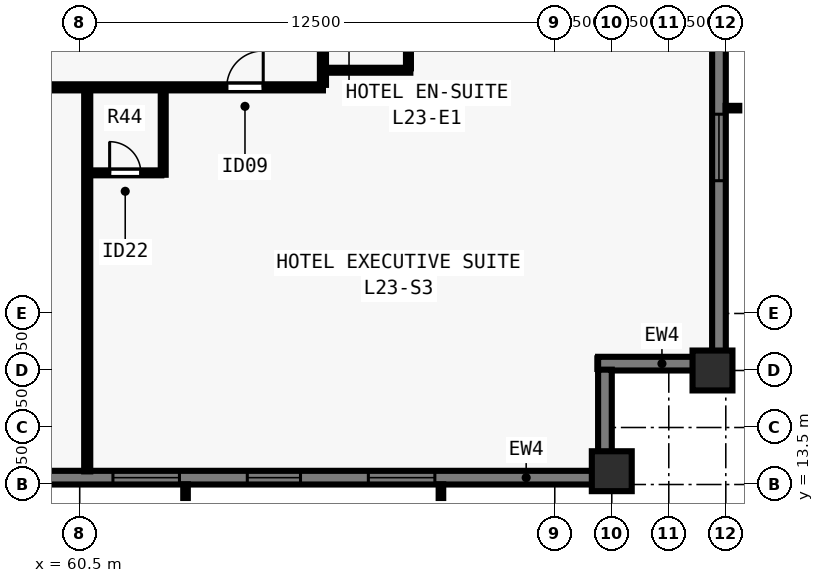
"""IFC4 building model, lengths in metres.
Left out: names, types, materials, properties, quantities, classifications, styles, units other than length and angle.
Written with IfcOpenShell. Run it as: python <this file> out.ifc"""

import sys

from ifc_helpers import new_model, si_unit, direction, frame, frame_2d, origin, origin_2d, place, context, subcontext, project, spatial, rectangle, extrude, element, fill, save


model = new_model("IFC4")
c1 = context("Model", 3, precision=1e-05, world=origin(), true_north=direction((0.0, 1.0)))
c2 = subcontext(c1, "Body", "Model", "MODEL_VIEW")
j1 = project(units=[si_unit("LENGTHUNIT", "METRE"), si_unit("PLANEANGLEUNIT", "RADIAN")], contexts=[c1])
p1 = place(None, origin())
s1 = spatial("IfcSite", under=j1, at=p1, CompositionType="ELEMENT")
p2 = place(p1, origin())
s2 = spatial("IfcBuilding", under=s1, at=p2, CompositionType="ELEMENT")
p3 = place(p2, frame((0.0, 0.0, 86.5)))
s3 = spatial("IfcBuildingStorey", under=s2, at=p3, CompositionType="ELEMENT", Elevation=86.5)
for number, where, z_axis, x_axis in (
    (1, (74.5, 13.85, 0.0), (0.0, 0.0, 1.0), (1.0, 0.0, 0.0)),
    (2, (77.15, 16.5, 0.0), (0.0, 0.0, 1.0), (0.0, 1.0, 0.0)),
):
    element("IfcColumn", number, at=place(p3, frame(where, z_axis=z_axis, x_axis=x_axis)), inside=s3, PredefinedType="COLUMN", context=c2, shape_type="SweptSolid", body=[
        extrude(rectangle(XDim=1.05, YDim=1.05, at=origin_2d()), origin(), (0.0, 0.0, 1.0), 3.5),
    ])
p4 = place(p3, frame((77.32, 61.5, 0.0), z_axis=(0.0, 0.0, 1.0), x_axis=(0.0, -1.0, 0.0)))
e3 = element("IfcWall", 3, at=p4, inside=s3, PredefinedType="SOLIDWALL", context=c2, shape_type="SweptSolid", body=[
    extrude(rectangle(XDim=44.662, YDim=0.36, at=frame_2d((22.331, 0.0))), origin(), (0.0, 0.0, 1.0), 3.28),
])
p5 = place(p4, frame((8.19, 0.0, 0.8)))
e4 = element("IfcOpeningElement", 4, at=p5, cuts=e3, PredefinedType="OPENING", context=c2, shape_type="SweptSolid", body=[
    extrude(rectangle(XDim=1.4, YDim=1.544, at=frame_2d((0.7, 0.772))), frame((0.0, 0.19, 0.0), z_axis=(0.0, -1.0, 0.0), x_axis=(1.0, 0.0, 0.0)), (0.0, 0.0, 1.0), 0.38),
])
p6 = place(p4, frame((11.375, 0.0, 0.8)))
e5 = element("IfcOpeningElement", 5, at=p6, cuts=e3, PredefinedType="OPENING", context=c2, shape_type="SweptSolid", body=[
    extrude(rectangle(XDim=1.75, YDim=1.544, at=frame_2d((0.875, 0.772))), frame((0.0, 0.19, 0.0), z_axis=(0.0, -1.0, 0.0), x_axis=(1.0, 0.0, 0.0)), (0.0, 0.0, 1.0), 0.38),
])
p7 = place(p4, frame((14.911, 0.0, 0.8)))
e6 = element("IfcOpeningElement", 6, at=p7, cuts=e3, PredefinedType="OPENING", context=c2, shape_type="SweptSolid", body=[
    extrude(rectangle(XDim=1.4, YDim=1.544, at=frame_2d((0.7, 0.772))), frame((0.0, 0.19, 0.0), z_axis=(0.0, -1.0, 0.0), x_axis=(1.0, 0.0, 0.0)), (0.0, 0.0, 1.0), 0.38),
])
p8 = place(p4, frame((21.631, 0.0, 0.8)))
e7 = element("IfcOpeningElement", 7, at=p8, cuts=e3, PredefinedType="OPENING", context=c2, shape_type="SweptSolid", body=[
    extrude(rectangle(XDim=1.4, YDim=1.544, at=frame_2d((0.7, 0.772))), frame((0.0, 0.19, 0.0), z_axis=(0.0, -1.0, 0.0), x_axis=(1.0, 0.0, 0.0)), (0.0, 0.0, 1.0), 0.38),
])
p9 = place(p4, frame((23.566, 0.0, 0.8)))
e8 = element("IfcOpeningElement", 8, at=p9, cuts=e3, PredefinedType="OPENING", context=c2, shape_type="SweptSolid", body=[
    extrude(rectangle(XDim=1.75, YDim=1.544, at=frame_2d((0.875, 0.772))), frame((0.0, 0.19, 0.0), z_axis=(0.0, -1.0, 0.0), x_axis=(1.0, 0.0, 0.0)), (0.0, 0.0, 1.0), 0.38),
])
p10 = place(p4, frame((28.351, 0.0, 0.8)))
e9 = element("IfcOpeningElement", 9, at=p10, cuts=e3, PredefinedType="OPENING", context=c2, shape_type="SweptSolid", body=[
    extrude(rectangle(XDim=1.4, YDim=1.544, at=frame_2d((0.7, 0.772))), frame((0.0, 0.19, 0.0), z_axis=(0.0, -1.0, 0.0), x_axis=(1.0, 0.0, 0.0)), (0.0, 0.0, 1.0), 0.38),
])
p11 = place(p4, frame((31.987, 0.0, 0.8)))
e10 = element("IfcOpeningElement", 10, at=p11, cuts=e3, PredefinedType="OPENING", context=c2, shape_type="SweptSolid", body=[
    extrude(rectangle(XDim=1.75, YDim=1.544, at=frame_2d((0.875, 0.772))), frame((0.0, 0.19, 0.0), z_axis=(0.0, -1.0, 0.0), x_axis=(1.0, 0.0, 0.0)), (0.0, 0.0, 1.0), 0.38),
])
p12 = place(p4, frame((35.072, 0.0, 0.8)))
e11 = element("IfcOpeningElement", 11, at=p12, cuts=e3, PredefinedType="OPENING", context=c2, shape_type="SweptSolid", body=[
    extrude(rectangle(XDim=1.4, YDim=1.544, at=frame_2d((0.7, 0.772))), frame((0.0, 0.19, 0.0), z_axis=(0.0, -1.0, 0.0), x_axis=(1.0, 0.0, 0.0)), (0.0, 0.0, 1.0), 0.38),
])
p13 = place(p4, frame((38.257, 0.0, 0.8)))
e12 = element("IfcOpeningElement", 12, at=p13, cuts=e3, PredefinedType="OPENING", context=c2, shape_type="SweptSolid", body=[
    extrude(rectangle(XDim=1.75, YDim=1.544, at=frame_2d((0.875, 0.772))), frame((0.0, 0.19, 0.0), z_axis=(0.0, -1.0, 0.0), x_axis=(1.0, 0.0, 0.0)), (0.0, 0.0, 1.0), 0.38),
])
p14 = place(p3, frame((77.5, 16.68, 0.0), z_axis=(0.0, 0.0, 1.0), x_axis=(-1.0, 0.0, 0.0)))
e13 = element("IfcWall", 13, at=p14, inside=s3, PredefinedType="SOLIDWALL", context=c2, shape_type="SweptSolid", body=[
    extrude(rectangle(XDim=3.36, YDim=0.36, at=frame_2d((1.68, 0.0))), origin(), (0.0, 0.0, 1.0), 3.28),
])
p15 = place(p3, frame((74.32, 16.522, 0.0), z_axis=(0.0, 0.0, 1.0), x_axis=(0.0, -1.0, 0.0)))
e14 = element("IfcWall", 14, at=p15, inside=s3, PredefinedType="SOLIDWALL", context=c2, shape_type="SweptSolid", body=[
    extrude(rectangle(XDim=2.684, YDim=0.36, at=frame_2d((1.342, 0.0))), origin(), (0.0, 0.0, 1.0), 3.28),
])
p16 = place(p3, frame((74.5, 13.68, 0.0), z_axis=(0.0, 0.0, 1.0), x_axis=(-1.0, 0.0, 0.0)))
e15 = element("IfcWall", 15, at=p16, inside=s3, PredefinedType="SOLIDWALL", context=c2, shape_type="SweptSolid", body=[
    extrude(rectangle(XDim=44.662, YDim=0.36, at=frame_2d((22.331, 0.0))), origin(), (0.0, 0.0, 1.0), 3.28),
])
p17 = place(p16, frame((4.655, 0.0, 0.8)))
e16 = element("IfcOpeningElement", 16, at=p17, cuts=e15, PredefinedType="OPENING", context=c2, shape_type="SweptSolid", body=[
    extrude(rectangle(XDim=1.75, YDim=1.544, at=frame_2d((0.875, 0.772))), frame((0.0, 0.19, 0.0), z_axis=(0.0, -1.0, 0.0), x_axis=(1.0, 0.0, 0.0)), (0.0, 0.0, 1.0), 0.38),
])
p18 = place(p16, frame((8.19, 0.0, 0.8)))
e17 = element("IfcOpeningElement", 17, at=p18, cuts=e15, PredefinedType="OPENING", context=c2, shape_type="SweptSolid", body=[
    extrude(rectangle(XDim=1.4, YDim=1.544, at=frame_2d((0.7, 0.772))), frame((0.0, 0.19, 0.0), z_axis=(0.0, -1.0, 0.0), x_axis=(1.0, 0.0, 0.0)), (0.0, 0.0, 1.0), 0.38),
])
p19 = place(p16, frame((11.375, 0.0, 0.8)))
e18 = element("IfcOpeningElement", 18, at=p19, cuts=e15, PredefinedType="OPENING", context=c2, shape_type="SweptSolid", body=[
    extrude(rectangle(XDim=1.75, YDim=1.544, at=frame_2d((0.875, 0.772))), frame((0.0, 0.19, 0.0), z_axis=(0.0, -1.0, 0.0), x_axis=(1.0, 0.0, 0.0)), (0.0, 0.0, 1.0), 0.38),
])
p20 = place(p16, frame((14.911, 0.0, 0.8)))
e19 = element("IfcOpeningElement", 19, at=p20, cuts=e15, PredefinedType="OPENING", context=c2, shape_type="SweptSolid", body=[
    extrude(rectangle(XDim=1.4, YDim=1.544, at=frame_2d((0.7, 0.772))), frame((0.0, 0.19, 0.0), z_axis=(0.0, -1.0, 0.0), x_axis=(1.0, 0.0, 0.0)), (0.0, 0.0, 1.0), 0.38),
])
p21 = place(p16, frame((18.546, 0.0, 0.8)))
e20 = element("IfcOpeningElement", 20, at=p21, cuts=e15, PredefinedType="OPENING", context=c2, shape_type="SweptSolid", body=[
    extrude(rectangle(XDim=1.75, YDim=1.544, at=frame_2d((0.875, 0.772))), frame((0.0, 0.19, 0.0), z_axis=(0.0, -1.0, 0.0), x_axis=(1.0, 0.0, 0.0)), (0.0, 0.0, 1.0), 0.38),
])
p22 = place(p16, frame((21.631, 0.0, 0.8)))
e21 = element("IfcOpeningElement", 21, at=p22, cuts=e15, PredefinedType="OPENING", context=c2, shape_type="SweptSolid", body=[
    extrude(rectangle(XDim=1.4, YDim=1.544, at=frame_2d((0.7, 0.772))), frame((0.0, 0.19, 0.0), z_axis=(0.0, -1.0, 0.0), x_axis=(1.0, 0.0, 0.0)), (0.0, 0.0, 1.0), 0.38),
])
p23 = place(p16, frame((24.366, 0.0, 0.8)))
e22 = element("IfcOpeningElement", 22, at=p23, cuts=e15, PredefinedType="OPENING", context=c2, shape_type="SweptSolid", body=[
    extrude(rectangle(XDim=1.75, YDim=1.544, at=frame_2d((0.875, 0.772))), frame((0.0, 0.19, 0.0), z_axis=(0.0, -1.0, 0.0), x_axis=(1.0, 0.0, 0.0)), (0.0, 0.0, 1.0), 0.38),
])
p24 = place(p16, frame((28.351, 0.0, 0.8)))
e23 = element("IfcOpeningElement", 23, at=p24, cuts=e15, PredefinedType="OPENING", context=c2, shape_type="SweptSolid", body=[
    extrude(rectangle(XDim=1.4, YDim=1.544, at=frame_2d((0.7, 0.772))), frame((0.0, 0.19, 0.0), z_axis=(0.0, -1.0, 0.0), x_axis=(1.0, 0.0, 0.0)), (0.0, 0.0, 1.0), 0.38),
])
p25 = place(p16, frame((31.987, 0.0, 0.8)))
e24 = element("IfcOpeningElement", 24, at=p25, cuts=e15, PredefinedType="OPENING", context=c2, shape_type="SweptSolid", body=[
    extrude(rectangle(XDim=1.75, YDim=1.544, at=frame_2d((0.875, 0.772))), frame((0.0, 0.19, 0.0), z_axis=(0.0, -1.0, 0.0), x_axis=(1.0, 0.0, 0.0)), (0.0, 0.0, 1.0), 0.38),
])
p26 = place(p16, frame((35.072, 0.0, 0.8)))
e25 = element("IfcOpeningElement", 25, at=p26, cuts=e15, PredefinedType="OPENING", context=c2, shape_type="SweptSolid", body=[
    extrude(rectangle(XDim=1.4, YDim=1.544, at=frame_2d((0.7, 0.772))), frame((0.0, 0.19, 0.0), z_axis=(0.0, -1.0, 0.0), x_axis=(1.0, 0.0, 0.0)), (0.0, 0.0, 1.0), 0.38),
])
p27 = place(p16, frame((38.257, 0.0, 0.8)))
e26 = element("IfcOpeningElement", 26, at=p27, cuts=e15, PredefinedType="OPENING", context=c2, shape_type="SweptSolid", body=[
    extrude(rectangle(XDim=1.75, YDim=1.544, at=frame_2d((0.875, 0.772))), frame((0.0, 0.19, 0.0), z_axis=(0.0, -1.0, 0.0), x_axis=(1.0, 0.0, 0.0)), (0.0, 0.0, 1.0), 0.38),
])
p28 = place(p3, frame((37.1, 23.95, 0.0), z_axis=(0.0, 0.0, 1.0), x_axis=(1.0, 0.0, 0.0)))
e27 = element("IfcWall", 27, at=p28, inside=s3, PredefinedType="PARTITIONING", context=c2, shape_type="SweptSolid", body=[
    extrude(rectangle(XDim=29.8, YDim=0.16, at=frame_2d((14.9, 0.0))), origin(), (0.0, 0.0, 1.0), 3.28),
])
p29 = place(p28, frame((2.571, 0.0, 0.0)))
e28 = element("IfcOpeningElement", 28, at=p29, cuts=e27, PredefinedType="OPENING", context=c2, shape_type="SweptSolid", body=[
    extrude(rectangle(XDim=0.96, YDim=2.15, at=frame_2d((0.48, 1.075))), frame((0.0, 0.09, 0.0), z_axis=(0.0, -1.0, 0.0), x_axis=(1.0, 0.0, 0.0)), (0.0, 0.0, 1.0), 0.18),
])
p30 = place(p28, frame((15.42, 0.0, 0.0)))
e29 = element("IfcOpeningElement", 29, at=p30, cuts=e27, PredefinedType="OPENING", context=c2, shape_type="SweptSolid", body=[
    extrude(rectangle(XDim=0.96, YDim=2.15, at=frame_2d((0.48, 1.075))), frame((0.0, 0.09, 0.0), z_axis=(0.0, -1.0, 0.0), x_axis=(1.0, 0.0, 0.0)), (0.0, 0.0, 1.0), 0.18),
])
p31 = place(p28, frame((27.269, 0.0, 0.0)))
e30 = element("IfcOpeningElement", 30, at=p31, cuts=e27, PredefinedType="OPENING", context=c2, shape_type="SweptSolid", body=[
    extrude(rectangle(XDim=0.96, YDim=2.15, at=frame_2d((0.48, 1.075))), frame((0.0, 0.09, 0.0), z_axis=(0.0, -1.0, 0.0), x_axis=(1.0, 0.0, 0.0)), (0.0, 0.0, 1.0), 0.18),
])
p32 = place(p3, frame((66.9, 24.015, 0.0), z_axis=(0.0, 0.0, 1.0), x_axis=(0.0, 1.0, 0.0)))
e31 = element("IfcWall", 31, at=p32, inside=s3, PredefinedType="PARTITIONING", context=c2, shape_type="SweptSolid", body=[
    extrude(rectangle(XDim=29.97, YDim=0.16, at=frame_2d((14.985, 0.0))), origin(), (0.0, 0.0, 1.0), 3.28),
])
p33 = place(p32, frame((3.911, 0.0, 0.0)))
e32 = element("IfcOpeningElement", 32, at=p33, cuts=e31, PredefinedType="OPENING", context=c2, shape_type="SweptSolid", body=[
    extrude(rectangle(XDim=0.96, YDim=2.15, at=frame_2d((0.48, 1.075))), frame((0.0, 0.09, 0.0), z_axis=(0.0, -1.0, 0.0), x_axis=(1.0, 0.0, 0.0)), (0.0, 0.0, 1.0), 0.18),
])
p34 = place(p32, frame((9.544, 0.0, 0.0)))
e33 = element("IfcOpeningElement", 33, at=p34, cuts=e31, PredefinedType="OPENING", context=c2, shape_type="SweptSolid", body=[
    extrude(rectangle(XDim=0.96, YDim=2.15, at=frame_2d((0.48, 1.075))), frame((0.0, 0.09, 0.0), z_axis=(0.0, -1.0, 0.0), x_axis=(1.0, 0.0, 0.0)), (0.0, 0.0, 1.0), 0.18),
])
p35 = place(p32, frame((15.625, 0.0, 0.0)))
e34 = element("IfcOpeningElement", 34, at=p35, cuts=e31, PredefinedType="OPENING", context=c2, shape_type="SweptSolid", body=[
    extrude(rectangle(XDim=0.96, YDim=2.15, at=frame_2d((0.48, 1.075))), frame((0.0, 0.09, 0.0), z_axis=(0.0, -1.0, 0.0), x_axis=(1.0, 0.0, 0.0)), (0.0, 0.0, 1.0), 0.18),
])
p36 = place(p32, frame((21.584, 0.0, 0.0)))
e35 = element("IfcOpeningElement", 35, at=p36, cuts=e31, PredefinedType="OPENING", context=c2, shape_type="SweptSolid", body=[
    extrude(rectangle(XDim=0.96, YDim=2.15, at=frame_2d((0.48, 1.075))), frame((0.0, 0.09, 0.0), z_axis=(0.0, -1.0, 0.0), x_axis=(1.0, 0.0, 0.0)), (0.0, 0.0, 1.0), 0.18),
])
p37 = place(p32, frame((27.494, 0.0, 0.0)))
e36 = element("IfcOpeningElement", 36, at=p37, cuts=e31, PredefinedType="OPENING", context=c2, shape_type="SweptSolid", body=[
    extrude(rectangle(XDim=0.96, YDim=2.15, at=frame_2d((0.48, 1.075))), frame((0.0, 0.09, 0.0), z_axis=(0.0, -1.0, 0.0), x_axis=(1.0, 0.0, 0.0)), (0.0, 0.0, 1.0), 0.18),
])
p38 = place(p3, frame((60.698, 13.845, 0.0), z_axis=(0.0, 0.0, 1.0), x_axis=(0.0, 1.0, 0.0)))
e37 = element("IfcWall", 37, at=p38, inside=s3, PredefinedType="PARTITIONING", context=c2, shape_type="SweptSolid", body=[
    extrude(rectangle(XDim=10.04, YDim=0.16, at=frame_2d((5.02, 0.0))), origin(), (0.0, 0.0, 1.0), 3.28),
])
p39 = place(p3, frame((62.698, 21.65, 0.0), z_axis=(0.0, 0.0, 1.0), x_axis=(0.0, 1.0, 0.0)))
e38 = element("IfcWall", 38, at=p39, inside=s3, PredefinedType="PLUMBINGWALL", context=c2, shape_type="SweptSolid", body=[
    extrude(rectangle(XDim=2.235, YDim=0.13, at=frame_2d((1.118, 0.0))), origin(), (0.0, 0.0, 1.0), 3.28),
])
p40 = place(p3, frame((60.762, 21.7, 0.0), z_axis=(0.0, 0.0, 1.0), x_axis=(1.0, 0.0, 0.0)))
e39 = element("IfcWall", 39, at=p40, inside=s3, PredefinedType="PLUMBINGWALL", context=c2, shape_type="SweptSolid", body=[
    extrude(rectangle(XDim=1.885, YDim=0.13, at=frame_2d((0.942, 0.0))), origin(), (0.0, 0.0, 1.0), 3.28),
])
p41 = place(p40, frame((0.525, 0.0, 0.0)))
e40 = element("IfcOpeningElement", 40, at=p41, cuts=e39, PredefinedType="OPENING", context=c2, shape_type="SweptSolid", body=[
    extrude(rectangle(XDim=0.82, YDim=2.1, at=frame_2d((0.41, 1.05))), frame((0.0, 0.075, 0.0), z_axis=(0.0, -1.0, 0.0), x_axis=(1.0, 0.0, 0.0)), (0.0, 0.0, 1.0), 0.15),
])
p42 = place(p3, frame((66.965, 24.4, 0.0), z_axis=(0.0, 0.0, 1.0), x_axis=(1.0, 0.0, 0.0)))
e41 = element("IfcWall", 41, at=p42, inside=s3, PredefinedType="PLUMBINGWALL", context=c2, shape_type="SweptSolid", body=[
    extrude(rectangle(XDim=2.235, YDim=0.13, at=frame_2d((1.117, 0.0))), origin(), (0.0, 0.0, 1.0), 2.849),
])
p43 = place(p3, frame((69.15, 24.45, 0.0), z_axis=(0.0, 0.0, 1.0), x_axis=(0.0, 1.0, 0.0)))
e42 = element("IfcWall", 42, at=p43, inside=s3, PredefinedType="PLUMBINGWALL", context=c2, shape_type="SweptSolid", body=[
    extrude(rectangle(XDim=1.9, YDim=0.13, at=frame_2d((0.95, 0.0))), origin(), (0.0, 0.0, 1.0), 3.28),
])
p44 = place(p43, frame((0.54, 0.0, 0.0)))
e43 = element("IfcOpeningElement", 43, at=p44, cuts=e42, PredefinedType="OPENING", context=c2, shape_type="SweptSolid", body=[
    extrude(rectangle(XDim=0.82, YDim=2.1, at=frame_2d((0.41, 1.05))), frame((0.0, 0.075, 0.0), z_axis=(0.0, -1.0, 0.0), x_axis=(1.0, 0.0, 0.0)), (0.0, 0.0, 1.0), 0.15),
])
p45 = place(p13, origin())
e44 = element("IfcWindow", 44, at=p45, inside=s3, PartitioningType="SINGLE_PANEL", PredefinedType="WINDOW", context=c2, shape_type="SweptSolid", body=[
    extrude(rectangle(XDim=1.75, YDim=1.544, at=frame_2d((0.875, 0.772))), frame((0.0, -0.05, 0.0), z_axis=(0.0, -1.0, 0.0), x_axis=(1.0, 0.0, 0.0)), (0.0, 0.0, 1.0), 0.06),
])
fill(e12, e44)
p46 = place(p17, origin())
e45 = element("IfcWindow", 45, at=p46, inside=s3, PartitioningType="SINGLE_PANEL", PredefinedType="WINDOW", context=c2, shape_type="SweptSolid", body=[
    extrude(rectangle(XDim=1.75, YDim=1.544, at=frame_2d((0.875, 0.772))), frame((0.0, -0.05, 0.0), z_axis=(0.0, -1.0, 0.0), x_axis=(1.0, 0.0, 0.0)), (0.0, 0.0, 1.0), 0.06),
])
fill(e16, e45)
p47 = place(p18, origin())
e46 = element("IfcWindow", 46, at=p47, inside=s3, PartitioningType="SINGLE_PANEL", PredefinedType="WINDOW", context=c2, shape_type="SweptSolid", body=[
    extrude(rectangle(XDim=1.4, YDim=1.544, at=frame_2d((0.7, 0.772))), frame((0.0, -0.05, 0.0), z_axis=(0.0, -1.0, 0.0), x_axis=(1.0, 0.0, 0.0)), (0.0, 0.0, 1.0), 0.06),
])
fill(e17, e46)
p48 = place(p19, origin())
e47 = element("IfcWindow", 47, at=p48, inside=s3, PartitioningType="SINGLE_PANEL", PredefinedType="WINDOW", context=c2, shape_type="SweptSolid", body=[
    extrude(rectangle(XDim=1.75, YDim=1.544, at=frame_2d((0.875, 0.772))), frame((0.0, -0.05, 0.0), z_axis=(0.0, -1.0, 0.0), x_axis=(1.0, 0.0, 0.0)), (0.0, 0.0, 1.0), 0.06),
])
fill(e18, e47)
p49 = place(p41, origin())
e48 = element("IfcDoor", 48, at=p49, inside=s3, OperationType="SINGLE_SWING_LEFT", PredefinedType="DOOR", context=c2, shape_type="SweptSolid", body=[
    extrude(rectangle(XDim=0.82, YDim=2.1, at=frame_2d((0.41, 1.05))), frame((0.0, 0.025, 0.0), z_axis=(0.0, -1.0, 0.0), x_axis=(1.0, 0.0, 0.0)), (0.0, 0.0, 1.0), 0.05),
])
fill(e40, e48)
p50 = place(p31, origin())
e49 = element("IfcDoor", 49, at=p50, inside=s3, OperationType="SINGLE_SWING_RIGHT", PredefinedType="DOOR", context=c2, shape_type="SweptSolid", body=[
    extrude(rectangle(XDim=0.96, YDim=2.15, at=frame_2d((0.48, 1.075))), frame((0.0, 0.025, 0.0), z_axis=(0.0, -1.0, 0.0), x_axis=(1.0, 0.0, 0.0)), (0.0, 0.0, 1.0), 0.05),
])
fill(e30, e49)
save(model, sys.argv[1])
